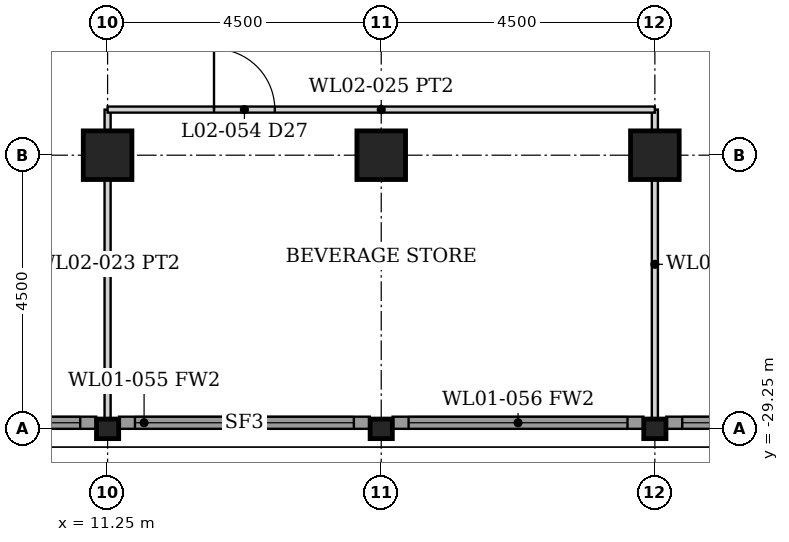
"""IFC4 building model, lengths in metres.
Left out: names, types, materials, properties, quantities, classifications, styles, units other than length and angle.
Written with IfcOpenShell. Run it as: python <this file> out.ifc"""

import sys

from ifc_helpers import new_model, si_unit, direction, frame, frame_2d, origin, origin_2d, place, context, subcontext, project, spatial, rectangle, hollow_rectangle, i_section, extrude, element, fill, save


model = new_model("IFC4")
c1 = context("Model", 3, precision=1e-05, world=origin(), true_north=direction((0.0, 1.0)))
c2 = subcontext(c1, "Body", "Model", "MODEL_VIEW")
j1 = project(units=[si_unit("LENGTHUNIT", "METRE"), si_unit("PLANEANGLEUNIT", "RADIAN")], contexts=[c1])
p1 = place(None, origin())
s1 = spatial("IfcSite", under=j1, at=p1, CompositionType="ELEMENT")
p2 = place(p1, origin())
s2 = spatial("IfcBuilding", under=s1, at=p2, CompositionType="ELEMENT")
p3 = place(p2, frame((0.0, 0.0, 11.0)))
s3 = spatial("IfcBuildingStorey", under=s2, at=p3, CompositionType="ELEMENT", Elevation=11.0)
for number, where, z_axis, x_axis in (
    (1, (11.25, -24.75, 0.0), (0.0, 0.0, 1.0), (0.0, 1.0, 0.0)),
    (2, (15.75, -24.75, 0.0), (0.0, 0.0, 1.0), (0.0, 1.0, 0.0)),
    (3, (20.25, -24.75, 0.0), (0.0, 0.0, 1.0), (0.0, 1.0, 0.0)),
):
    element("IfcColumn", number, at=place(p3, frame(where, z_axis=z_axis, x_axis=x_axis)), inside=s3, PredefinedType="COLUMN", context=c2, shape_type="SweptSolid", body=[
        extrude(hollow_rectangle(XDim=0.8, YDim=0.8, WallThickness=0.08, at=origin_2d()), origin(), (0.0, 0.0, 1.0), 5.0),
    ])
for number, where, z_axis, x_axis in (
    (4, (11.25, -29.25, 0.0), (0.0, 0.0, 1.0), (0.0, 1.0, 0.0)),
    (5, (15.75, -29.25, 0.0), (0.0, 0.0, 1.0), (0.0, 1.0, 0.0)),
    (6, (20.25, -29.25, 0.0), (0.0, 0.0, 1.0), (0.0, 1.0, 0.0)),
):
    element("IfcColumn", number, at=place(p3, frame(where, z_axis=z_axis, x_axis=x_axis)), inside=s3, PredefinedType="COLUMN", context=c2, shape_type="SweptSolid", body=[
        extrude(i_section(OverallWidth=0.322, OverallDepth=0.365, WebThickness=0.027, FlangeThickness=0.044, FilletRadius=0.015, at=origin_2d()), origin(), (0.0, 0.0, 1.0), 5.0),
    ])
p4 = place(p3, frame((6.938, -29.15, 0.0), z_axis=(0.0, 0.0, 1.0), x_axis=(1.0, 0.0, 0.0)))
e7 = element("IfcWall", 7, at=p4, inside=s3, PredefinedType="SOLIDWALL", context=c2, shape_type="SweptSolid", body=[
    extrude(rectangle(XDim=4.125, YDim=0.2, at=frame_2d((2.062, 0.0))), origin(), (0.0, 0.0, 1.0), 4.133),
])
p5 = place(p4, frame((0.262, 0.0, 0.15)))
e8 = element("IfcOpeningElement", 8, at=p5, cuts=e7, PredefinedType="OPENING", context=c2, shape_type="SweptSolid", body=[
    extrude(rectangle(XDim=3.6, YDim=3.833, at=frame_2d((1.8, 1.917))), frame((0.0, 0.11, 0.0), z_axis=(0.0, -1.0, 0.0), x_axis=(1.0, 0.0, 0.0)), (0.0, 0.0, 1.0), 0.22),
])
p6 = place(p3, frame((11.438, -29.15, 0.0), z_axis=(0.0, 0.0, 1.0), x_axis=(1.0, 0.0, 0.0)))
e9 = element("IfcWall", 9, at=p6, inside=s3, PredefinedType="SOLIDWALL", context=c2, shape_type="SweptSolid", body=[
    extrude(rectangle(XDim=4.125, YDim=0.2, at=frame_2d((2.062, 0.0))), origin(), (0.0, 0.0, 1.0), 4.133),
])
p7 = place(p6, frame((0.262, 0.0, 0.15)))
e10 = element("IfcOpeningElement", 10, at=p7, cuts=e9, PredefinedType="OPENING", context=c2, shape_type="SweptSolid", body=[
    extrude(rectangle(XDim=3.6, YDim=3.833, at=frame_2d((1.8, 1.917))), frame((0.0, 0.11, 0.0), z_axis=(0.0, -1.0, 0.0), x_axis=(1.0, 0.0, 0.0)), (0.0, 0.0, 1.0), 0.22),
])
p8 = place(p3, frame((15.938, -29.15, 0.0), z_axis=(0.0, 0.0, 1.0), x_axis=(1.0, 0.0, 0.0)))
e11 = element("IfcWall", 11, at=p8, inside=s3, PredefinedType="SOLIDWALL", context=c2, shape_type="SweptSolid", body=[
    extrude(rectangle(XDim=4.125, YDim=0.2, at=frame_2d((2.062, 0.0))), origin(), (0.0, 0.0, 1.0), 4.133),
])
p9 = place(p8, frame((0.262, 0.0, 0.15)))
e12 = element("IfcOpeningElement", 12, at=p9, cuts=e11, PredefinedType="OPENING", context=c2, shape_type="SweptSolid", body=[
    extrude(rectangle(XDim=3.6, YDim=3.833, at=frame_2d((1.8, 1.917))), frame((0.0, 0.11, 0.0), z_axis=(0.0, -1.0, 0.0), x_axis=(1.0, 0.0, 0.0)), (0.0, 0.0, 1.0), 0.22),
])
p10 = place(p3, frame((20.438, -29.15, 0.0), z_axis=(0.0, 0.0, 1.0), x_axis=(1.0, 0.0, 0.0)))
e13 = element("IfcWall", 13, at=p10, inside=s3, PredefinedType="SOLIDWALL", context=c2, shape_type="SweptSolid", body=[
    extrude(rectangle(XDim=4.125, YDim=0.2, at=frame_2d((2.062, 0.0))), origin(), (0.0, 0.0, 1.0), 4.133),
])
p11 = place(p10, frame((0.262, 0.0, 0.15)))
e14 = element("IfcOpeningElement", 14, at=p11, cuts=e13, PredefinedType="OPENING", context=c2, shape_type="SweptSolid", body=[
    extrude(rectangle(XDim=3.6, YDim=3.833, at=frame_2d((1.8, 1.917))), frame((0.0, 0.11, 0.0), z_axis=(0.0, -1.0, 0.0), x_axis=(1.0, 0.0, 0.0)), (0.0, 0.0, 1.0), 0.22),
])
for number, where, z_axis, x_axis in (
    (15, (11.25, -29.089, 0.0), (0.0, 0.0, 1.0), (0.0, 1.0, 0.0)),
    (16, (20.25, -29.089, 0.0), (0.0, 0.0, 1.0), (0.0, 1.0, 0.0)),
):
    element("IfcWall", number, at=place(p3, frame(where, z_axis=z_axis, x_axis=x_axis)), inside=s3, PredefinedType="PARTITIONING", context=c2, shape_type="SweptSolid", body=[
        extrude(rectangle(XDim=5.089, YDim=0.1, at=frame_2d((2.544, 0.0))), origin(), (0.0, 0.0, 1.0), 3.829),
    ])
p12 = place(p3, frame((11.25, -24.0, 0.0), z_axis=(0.0, 0.0, 1.0), x_axis=(1.0, 0.0, 0.0)))
e17 = element("IfcWall", 17, at=p12, inside=s3, PredefinedType="PARTITIONING", context=c2, shape_type="SweptSolid", body=[
    extrude(rectangle(XDim=9.0, YDim=0.1, at=frame_2d((4.5, 0.0))), origin(), (0.0, 0.0, 1.0), 3.829),
])
p13 = place(p12, frame((1.75, 0.0, 0.0)))
e18 = element("IfcOpeningElement", 18, at=p13, cuts=e17, PredefinedType="OPENING", context=c2, shape_type="SweptSolid", body=[
    extrude(rectangle(XDim=1.0, YDim=2.1, at=frame_2d((0.5, 1.05))), frame((0.0, 0.06, 0.0), z_axis=(0.0, -1.0, 0.0), x_axis=(1.0, 0.0, 0.0)), (0.0, 0.0, 1.0), 0.12),
])
p14 = place(p5, origin())
e19 = element("IfcWindow", 19, at=p14, inside=s3, PartitioningType="SINGLE_PANEL", PredefinedType="WINDOW", context=c2, shape_type="SweptSolid", body=[
    extrude(rectangle(XDim=3.6, YDim=3.833, at=frame_2d((1.8, 1.917))), frame((0.0, 0.03, 0.0), z_axis=(0.0, -1.0, 0.0), x_axis=(1.0, 0.0, 0.0)), (0.0, 0.0, 1.0), 0.06),
])
fill(e8, e19)
p15 = place(p7, origin())
e20 = element("IfcWindow", 20, at=p15, inside=s3, PartitioningType="SINGLE_PANEL", PredefinedType="WINDOW", context=c2, shape_type="SweptSolid", body=[
    extrude(rectangle(XDim=3.6, YDim=3.833, at=frame_2d((1.8, 1.917))), frame((0.0, 0.03, 0.0), z_axis=(0.0, -1.0, 0.0), x_axis=(1.0, 0.0, 0.0)), (0.0, 0.0, 1.0), 0.06),
])
fill(e10, e20)
p16 = place(p9, origin())
e21 = element("IfcWindow", 21, at=p16, inside=s3, PartitioningType="SINGLE_PANEL", PredefinedType="WINDOW", context=c2, shape_type="SweptSolid", body=[
    extrude(rectangle(XDim=3.6, YDim=3.833, at=frame_2d((1.8, 1.917))), frame((0.0, 0.03, 0.0), z_axis=(0.0, -1.0, 0.0), x_axis=(1.0, 0.0, 0.0)), (0.0, 0.0, 1.0), 0.06),
])
fill(e12, e21)
p17 = place(p11, origin())
e22 = element("IfcWindow", 22, at=p17, inside=s3, PartitioningType="SINGLE_PANEL", PredefinedType="WINDOW", context=c2, shape_type="SweptSolid", body=[
    extrude(rectangle(XDim=3.6, YDim=3.833, at=frame_2d((1.8, 1.917))), frame((0.0, 0.03, 0.0), z_axis=(0.0, -1.0, 0.0), x_axis=(1.0, 0.0, 0.0)), (0.0, 0.0, 1.0), 0.06),
])
fill(e14, e22)
p18 = place(p13, origin())
e23 = element("IfcDoor", 23, at=p18, inside=s3, OperationType="SINGLE_SWING_LEFT", PredefinedType="DOOR", context=c2, shape_type="SweptSolid", body=[
    extrude(rectangle(XDim=1.0, YDim=2.1, at=frame_2d((0.5, 1.05))), frame((0.0, 0.025, 0.0), z_axis=(0.0, -1.0, 0.0), x_axis=(1.0, 0.0, 0.0)), (0.0, 0.0, 1.0), 0.05),
])
fill(e18, e23)
save(model, sys.argv[1])
